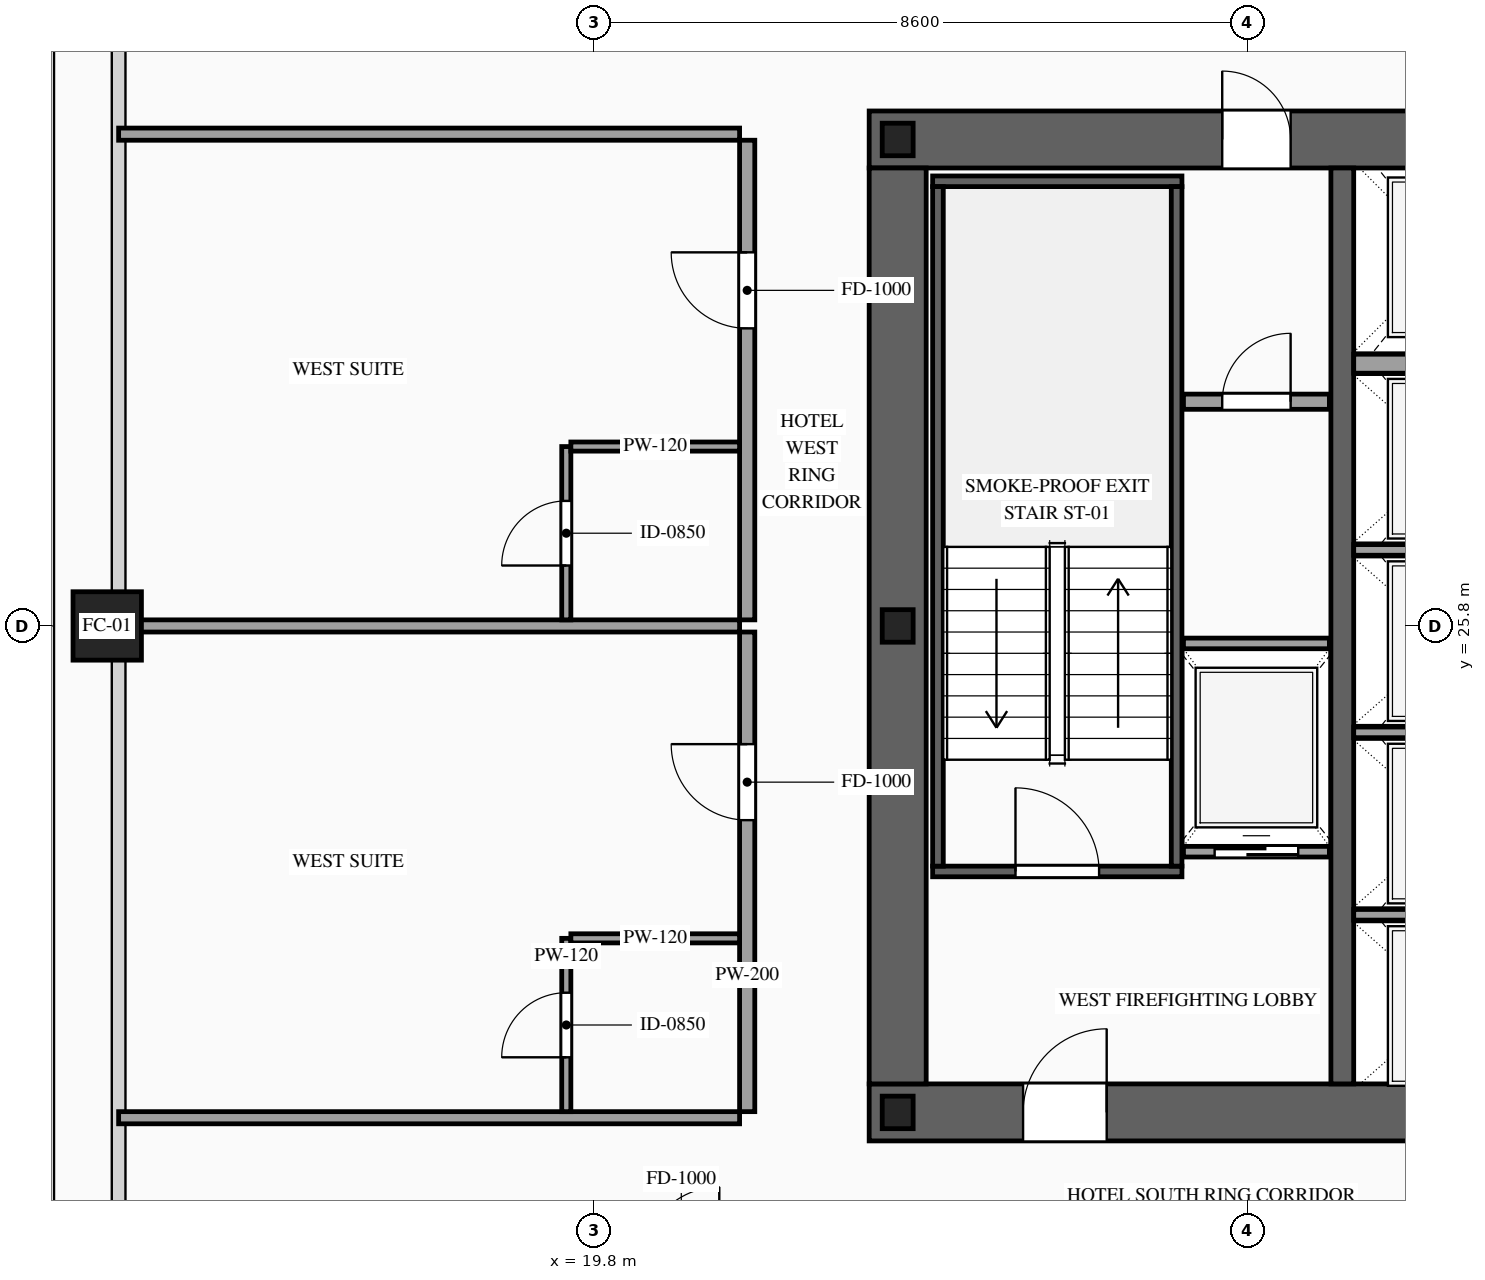
"""IFC4 building model, lengths in metres.
Left out: names, types, materials, properties, quantities, classifications, styles, units other than length and angle.
Written with IfcOpenShell. Run it as: python <this file> out.ifc"""

import sys

from ifc_helpers import new_model, si_unit, direction, frame, frame_2d, origin, origin_2d, place, context, subcontext, project, spatial, rectangle, hollow_rectangle, i_section, extrude, source, transform, mapped, element, fill, save


model = new_model("IFC4")
c1 = context("Model", 3, precision=1e-05, world=origin(), true_north=direction((0.0, 1.0)))
c2 = subcontext(c1, "Body", "Model", "MODEL_VIEW")
j1 = project(units=[si_unit("LENGTHUNIT", "METRE"), si_unit("PLANEANGLEUNIT", "RADIAN")], contexts=[c1])
p1 = place(None, origin())
s1 = spatial("IfcSite", under=j1, at=p1, CompositionType="ELEMENT")
p2 = place(p1, origin())
s2 = spatial("IfcBuilding", under=s1, at=p2, CompositionType="ELEMENT")
p3 = place(p2, frame((0.0, 0.0, 93.8)))
s3 = spatial("IfcBuildingStorey", under=s2, at=p3, CompositionType="ELEMENT", Elevation=93.8)
p4 = place(p3, frame((23.425, 19.4, 0.0), z_axis=(0.0, 0.0, 1.0), x_axis=(1.0, 0.0, 0.0)))
e1 = element("IfcWall", 1, at=p4, inside=s3, PredefinedType="SHEAR", context=c2, shape_type="SweptSolid", body=[
    extrude(rectangle(XDim=27.15, YDim=0.75, at=frame_2d((13.575, 0.0))), origin(), (0.0, 0.0, 1.0), 3.6),
])
p5 = place(p4, frame((2.025, 0.0, 0.0)))
e2 = element("IfcOpeningElement", 2, at=p5, cuts=e1, PredefinedType="OPENING", context=c2, shape_type="SweptSolid", body=[
    extrude(rectangle(XDim=1.1, YDim=2.2, at=frame_2d((0.55, 1.1))), frame((0.0, 0.39, 0.0), z_axis=(0.0, -1.0, 0.0), x_axis=(1.0, 0.0, 0.0)), (0.0, 0.0, 1.0), 0.78),
])
p6 = place(p4, frame((9.925, 0.0, 0.0)))
e3 = element("IfcOpeningElement", 3, at=p6, cuts=e1, PredefinedType="OPENING", context=c2, shape_type="SweptSolid", body=[
    extrude(rectangle(XDim=1.1, YDim=2.2, at=frame_2d((0.55, 1.1))), frame((0.0, 0.39, 0.0), z_axis=(0.0, -1.0, 0.0), x_axis=(1.0, 0.0, 0.0)), (0.0, 0.0, 1.0), 0.78),
])
p7 = place(p4, frame((23.125, 0.0, 0.0)))
e4 = element("IfcOpeningElement", 4, at=p7, cuts=e1, PredefinedType="OPENING", context=c2, shape_type="SweptSolid", body=[
    extrude(rectangle(XDim=1.1, YDim=2.2, at=frame_2d((0.55, 1.1))), frame((0.0, 0.39, 0.0), z_axis=(0.0, -1.0, 0.0), x_axis=(1.0, 0.0, 0.0)), (0.0, 0.0, 1.0), 0.78),
])
p8 = place(p4, frame((19.745, 0.0, 0.0)))
e5 = element("IfcOpeningElement", 5, at=p8, cuts=e1, PredefinedType="OPENING", context=c2, shape_type="SweptSolid", body=[
    extrude(rectangle(XDim=0.9, YDim=2.15, at=frame_2d((0.45, 1.075))), frame((0.0, 0.39, 0.0), z_axis=(0.0, -1.0, 0.0), x_axis=(1.0, 0.0, 0.0)), (0.0, 0.0, 1.0), 0.78),
])
p9 = place(p4, frame((18.305, 0.0, 0.0)))
e6 = element("IfcOpeningElement", 6, at=p9, cuts=e1, PredefinedType="OPENING", context=c2, shape_type="SweptSolid", body=[
    extrude(rectangle(XDim=0.9, YDim=2.15, at=frame_2d((0.45, 1.075))), frame((0.0, 0.39, 0.0), z_axis=(0.0, -1.0, 0.0), x_axis=(1.0, 0.0, 0.0)), (0.0, 0.0, 1.0), 0.78),
])
p10 = place(p3, frame((23.425, 32.2, 0.0), z_axis=(0.0, 0.0, 1.0), x_axis=(1.0, 0.0, 0.0)))
e7 = element("IfcWall", 7, at=p10, inside=s3, PredefinedType="SHEAR", context=c2, shape_type="SweptSolid", body=[
    extrude(rectangle(XDim=27.15, YDim=0.75, at=frame_2d((13.575, 0.0))), origin(), (0.0, 0.0, 1.0), 3.6),
])
p11 = place(p10, frame((4.645, 0.0, 0.0)))
e8 = element("IfcOpeningElement", 8, at=p11, cuts=e7, PredefinedType="OPENING", context=c2, shape_type="SweptSolid", body=[
    extrude(rectangle(XDim=0.9, YDim=2.15, at=frame_2d((0.45, 1.075))), frame((0.0, 0.39, 0.0), z_axis=(0.0, -1.0, 0.0), x_axis=(1.0, 0.0, 0.0)), (0.0, 0.0, 1.0), 0.78),
])
p12 = place(p10, frame((9.925, 0.0, 0.0)))
e9 = element("IfcOpeningElement", 9, at=p12, cuts=e7, PredefinedType="OPENING", context=c2, shape_type="SweptSolid", body=[
    extrude(rectangle(XDim=1.1, YDim=2.2, at=frame_2d((0.55, 1.1))), frame((0.0, 0.39, 0.0), z_axis=(0.0, -1.0, 0.0), x_axis=(1.0, 0.0, 0.0)), (0.0, 0.0, 1.0), 0.78),
])
p13 = place(p10, frame((15.775, 0.0, 0.0)))
e10 = element("IfcOpeningElement", 10, at=p13, cuts=e7, PredefinedType="OPENING", context=c2, shape_type="SweptSolid", body=[
    extrude(rectangle(XDim=1.1, YDim=2.2, at=frame_2d((0.55, 1.1))), frame((0.0, 0.39, 0.0), z_axis=(0.0, -1.0, 0.0), x_axis=(1.0, 0.0, 0.0)), (0.0, 0.0, 1.0), 0.78),
])
p14 = place(p10, frame((18.975, 0.0, 0.0)))
e11 = element("IfcOpeningElement", 11, at=p14, cuts=e7, PredefinedType="OPENING", context=c2, shape_type="SweptSolid", body=[
    extrude(rectangle(XDim=0.9, YDim=2.15, at=frame_2d((0.45, 1.075))), frame((0.0, 0.39, 0.0), z_axis=(0.0, -1.0, 0.0), x_axis=(1.0, 0.0, 0.0)), (0.0, 0.0, 1.0), 0.78),
])
m1 = source(origin(), c2, "Body", "SweptSolid", [
    extrude(rectangle(XDim=12.05, YDim=0.75, at=frame_2d((6.025, 0.0))), origin(), (0.0, 0.0, 1.0), 3.6),
])
p15 = place(p3, frame((23.8, 19.775, 0.0), z_axis=(0.0, 0.0, 1.0), x_axis=(0.0, 1.0, 0.0)))
e12 = element("IfcWall", 12, at=p15, inside=s3, PredefinedType="SHEAR", context=c2, shape_type="MappedRepresentation", body=[
    mapped(m1, transform((0.0, 0.0, 0.0), scale=1.0)),
])
m2 = source(origin(), c2, "Body", "SweptSolid", [
    extrude(rectangle(XDim=12.05, YDim=0.3, at=frame_2d((6.025, 0.0))), origin(), (0.0, 0.0, 1.0), 3.6),
])
p16 = place(p3, frame((29.65, 19.775, 0.0), z_axis=(0.0, 0.0, 1.0), x_axis=(0.0, 1.0, 0.0)))
e13 = element("IfcWall", 13, at=p16, inside=s3, PredefinedType="SOLIDWALL", context=c2, shape_type="MappedRepresentation", body=[
    mapped(m2, transform((0.0, 0.0, 0.0), scale=1.0)),
])
m3 = source(origin(), c2, "Body", "SweptSolid", [
    extrude(i_section(OverallWidth=0.407, OverallDepth=0.428, WebThickness=0.02, FlangeThickness=0.035, at=origin_2d()), origin(), (0.0, 0.0, 1.0), 3.6),
])
for number, where, z_axis, x_axis in (
    (14, (23.8, 19.4, 0.0), (0.0, 0.0, 1.0), (1.0, 0.0, 0.0)),
    (15, (23.8, 25.8, 0.0), (0.0, 0.0, 1.0), (1.0, 0.0, 0.0)),
    (16, (23.8, 32.2, 0.0), (0.0, 0.0, 1.0), (1.0, 0.0, 0.0)),
):
    element("IfcColumn", number, at=place(p3, frame(where, z_axis=z_axis, x_axis=x_axis)), inside=s3, PredefinedType="COLUMN", context=c2, shape_type="MappedRepresentation", body=[
        mapped(m3, transform((0.0, 0.0, 0.0), scale=1.0)),
    ])
m4 = source(origin(), c2, "Body", "SweptSolid", [
    extrude(hollow_rectangle(XDim=0.9, YDim=0.9, WallThickness=0.042, at=origin_2d()), origin(), (0.0, 0.0, 1.0), 3.6),
])
p17 = place(p3, frame((13.4, 25.8, 0.0), z_axis=(0.0, 0.0, 1.0), x_axis=(1.0, 0.0, 0.0)))
e17 = element("IfcColumn", 17, at=p17, inside=s3, PredefinedType="COLUMN", context=c2, shape_type="MappedRepresentation", body=[
    mapped(m4, transform((0.0, 0.0, 0.0), scale=1.0)),
])
p18 = place(p3, frame((27.56, 22.83, 0.0), z_axis=(0.0, 0.0, 1.0), x_axis=(1.0, 0.0, 0.0)))
e18 = element("IfcWall", 18, at=p18, inside=s3, PredefinedType="SOLIDWALL", context=c2, shape_type="SweptSolid", body=[
    extrude(rectangle(XDim=1.92, YDim=0.14, at=frame_2d((0.96, 0.0))), origin(), (0.0, 0.0, 1.0), 3.38),
])
p19 = place(p18, frame((0.41, 0.0, 0.0)))
e19 = element("IfcOpeningElement", 19, at=p19, cuts=e18, PredefinedType="OPENING", context=c2, shape_type="SweptSolid", body=[
    extrude(rectangle(XDim=1.1, YDim=2.2, at=frame_2d((0.55, 1.1))), frame((0.0, 0.085, 0.0), z_axis=(0.0, -1.0, 0.0), x_axis=(1.0, 0.0, 0.0)), (0.0, 0.0, 1.0), 0.17),
])
m5 = source(origin(), c2, "Body", "SweptSolid", [
    extrude(rectangle(XDim=1.92, YDim=0.14, at=frame_2d((0.96, 0.0))), origin(), (0.0, 0.0, 1.0), 3.38),
])
p20 = place(p3, frame((27.56, 25.57, 0.0), z_axis=(0.0, 0.0, 1.0), x_axis=(1.0, 0.0, 0.0)))
e20 = element("IfcWall", 20, at=p20, inside=s3, PredefinedType="SOLIDWALL", context=c2, shape_type="MappedRepresentation", body=[
    mapped(m5, transform((0.0, 0.0, 0.0), scale=1.0)),
])
m6 = source(origin(), c2, "Body", "SweptSolid", [
    extrude(rectangle(XDim=2.5, YDim=0.14, at=frame_2d((1.25, 0.0))), origin(), (0.0, 0.0, 1.0), 3.38),
])
for number, where, z_axis, x_axis in (
    (21, (29.8, 22.0, 0.0), (0.0, 0.0, 1.0), (1.0, 0.0, 0.0)),
    (22, (29.8, 24.4, 0.0), (0.0, 0.0, 1.0), (1.0, 0.0, 0.0)),
    (23, (29.8, 26.8, 0.0), (0.0, 0.0, 1.0), (1.0, 0.0, 0.0)),
):
    element("IfcWall", number, at=place(p3, frame(where, z_axis=z_axis, x_axis=x_axis)), inside=s3, PredefinedType="SOLIDWALL", context=c2, shape_type="MappedRepresentation", body=[
        mapped(m6, transform((0.0, 0.0, 0.0), scale=1.0)),
    ])
m7 = source(origin(), c2, "Body", "SweptSolid", [
    extrude(rectangle(XDim=2.5, YDim=0.25, at=frame_2d((1.25, 0.0))), origin(), (0.0, 0.0, 1.0), 3.38),
])
p21 = place(p3, frame((29.8, 29.25, 0.0), z_axis=(0.0, 0.0, 1.0), x_axis=(1.0, 0.0, 0.0)))
e24 = element("IfcWall", 24, at=p21, inside=s3, PredefinedType="SOLIDWALL", context=c2, shape_type="MappedRepresentation", body=[
    mapped(m7, transform((0.0, 0.0, 0.0), scale=1.0)),
])
p22 = place(p3, frame((24.26, 22.57, 0.0), z_axis=(0.0, 0.0, 1.0), x_axis=(1.0, 0.0, 0.0)))
e25 = element("IfcWall", 25, at=p22, inside=s3, PredefinedType="SOLIDWALL", context=c2, shape_type="SweptSolid", body=[
    extrude(rectangle(XDim=3.28, YDim=0.14, at=frame_2d((1.64, 0.0))), origin(), (0.0, 0.0, 1.0), 3.38),
])
p23 = place(p22, frame((1.09, 0.0, 0.0)))
e26 = element("IfcOpeningElement", 26, at=p23, cuts=e25, PredefinedType="OPENING", context=c2, shape_type="SweptSolid", body=[
    extrude(rectangle(XDim=1.1, YDim=2.2, at=frame_2d((0.55, 1.1))), frame((0.0, 0.085, 0.0), z_axis=(0.0, -1.0, 0.0), x_axis=(1.0, 0.0, 0.0)), (0.0, 0.0, 1.0), 0.17),
])
m8 = source(origin(), c2, "Body", "SweptSolid", [
    extrude(rectangle(XDim=3.28, YDim=0.14, at=frame_2d((1.64, 0.0))), origin(), (0.0, 0.0, 1.0), 3.38),
])
p24 = place(p3, frame((24.26, 31.65, 0.0), z_axis=(0.0, 0.0, 1.0), x_axis=(1.0, 0.0, 0.0)))
e27 = element("IfcWall", 27, at=p24, inside=s3, PredefinedType="SOLIDWALL", context=c2, shape_type="MappedRepresentation", body=[
    mapped(m8, transform((0.0, 0.0, 0.0), scale=1.0)),
])
m9 = source(origin(), c2, "Body", "SweptSolid", [
    extrude(rectangle(XDim=8.94, YDim=0.14, at=frame_2d((4.47, 0.0))), origin(), (0.0, 0.0, 1.0), 3.38),
])
for number, where, z_axis, x_axis in (
    (28, (24.33, 22.64, 0.0), (0.0, 0.0, 1.0), (0.0, 1.0, 0.0)),
    (29, (27.47, 22.64, 0.0), (0.0, 0.0, 1.0), (0.0, 1.0, 0.0)),
):
    element("IfcWall", number, at=place(p3, frame(where, z_axis=z_axis, x_axis=x_axis)), inside=s3, PredefinedType="SOLIDWALL", context=c2, shape_type="MappedRepresentation", body=[
        mapped(m9, transform((0.0, 0.0, 0.0), scale=1.0)),
    ])
p25 = place(p3, frame((27.56, 28.75, 0.0), z_axis=(0.0, 0.0, 1.0), x_axis=(1.0, 0.0, 0.0)))
e30 = element("IfcWall", 30, at=p25, inside=s3, PredefinedType="PARTITIONING", context=c2, shape_type="SweptSolid", body=[
    extrude(rectangle(XDim=1.92, YDim=0.2, at=frame_2d((0.96, 0.0))), origin(), (0.0, 0.0, 1.0), 3.38),
])
p26 = place(p25, frame((0.51, 0.0, 0.0)))
e31 = element("IfcOpeningElement", 31, at=p26, cuts=e30, PredefinedType="OPENING", context=c2, shape_type="SweptSolid", body=[
    extrude(rectangle(XDim=0.9, YDim=2.15, at=frame_2d((0.45, 1.075))), frame((0.0, 0.115, 0.0), z_axis=(0.0, -1.0, 0.0), x_axis=(1.0, 0.0, 0.0)), (0.0, 0.0, 1.0), 0.23),
])
p27 = place(p3, frame((21.82, 19.41, 0.0), z_axis=(0.0, 0.0, 1.0), x_axis=(0.0, 1.0, 0.0)))
e32 = element("IfcWall", 32, at=p27, inside=s3, PredefinedType="PARTITIONING", context=c2, shape_type="SweptSolid", body=[
    extrude(rectangle(XDim=6.31, YDim=0.2, at=frame_2d((3.155, 0.0))), origin(), (0.0, 0.0, 1.0), 3.38),
])
p28 = place(p27, frame((3.835, 0.0, 0.0)))
e33 = element("IfcOpeningElement", 33, at=p28, cuts=e32, PredefinedType="OPENING", context=c2, shape_type="SweptSolid", body=[
    extrude(rectangle(XDim=1.0, YDim=2.2, at=frame_2d((0.5, 1.1))), frame((0.0, 0.115, 0.0), z_axis=(0.0, -1.0, 0.0), x_axis=(1.0, 0.0, 0.0)), (0.0, 0.0, 1.0), 0.23),
])
m10 = source(origin(), c2, "Body", "SweptSolid", [
    extrude(rectangle(XDim=8.17, YDim=0.16, at=frame_2d((4.085, 0.0))), origin(), (0.0, 0.0, 1.0), 2.675),
])
p29 = place(p3, frame((13.55, 25.8, 0.0), z_axis=(0.0, 0.0, 1.0), x_axis=(1.0, 0.0, 0.0)))
e34 = element("IfcWall", 34, at=p29, inside=s3, PredefinedType="PARTITIONING", context=c2, shape_type="MappedRepresentation", body=[
    mapped(m10, transform((0.0, 0.0, 0.0), scale=1.0)),
])
m11 = source(origin(), c2, "Body", "SweptSolid", [
    extrude(rectangle(XDim=8.17, YDim=0.16, at=frame_2d((4.085, 0.0))), origin(), (0.0, 0.0, 1.0), 2.875),
])
p30 = place(p3, frame((13.55, 19.33, 0.0), z_axis=(0.0, 0.0, 1.0), x_axis=(1.0, 0.0, 0.0)))
e35 = element("IfcWall", 35, at=p30, inside=s3, PredefinedType="PARTITIONING", context=c2, shape_type="MappedRepresentation", body=[
    mapped(m11, transform((0.0, 0.0, 0.0), scale=1.0)),
])
p31 = place(p3, frame((19.44, 19.41, 0.0), z_axis=(0.0, 0.0, 1.0), x_axis=(0.0, 1.0, 0.0)))
e36 = element("IfcWall", 36, at=p31, inside=s3, PredefinedType="PARTITIONING", context=c2, shape_type="SweptSolid", body=[
    extrude(rectangle(XDim=2.28, YDim=0.12, at=frame_2d((1.14, 0.0))), origin(), (0.0, 0.0, 1.0), 3.38),
])
p32 = place(p31, frame((0.715, 0.0, 0.0)))
e37 = element("IfcOpeningElement", 37, at=p32, cuts=e36, PredefinedType="OPENING", context=c2, shape_type="SweptSolid", body=[
    extrude(rectangle(XDim=0.85, YDim=2.1, at=frame_2d((0.425, 1.05))), frame((0.0, 0.075, 0.0), z_axis=(0.0, -1.0, 0.0), x_axis=(1.0, 0.0, 0.0)), (0.0, 0.0, 1.0), 0.15),
])
m12 = source(origin(), c2, "Body", "SweptSolid", [
    extrude(rectangle(XDim=2.22, YDim=0.12, at=frame_2d((1.11, 0.0))), origin(), (0.0, 0.0, 1.0), 3.38),
])
p33 = place(p3, frame((19.5, 21.69, 0.0), z_axis=(0.0, 0.0, 1.0), x_axis=(1.0, 0.0, 0.0)))
e38 = element("IfcWall", 38, at=p33, inside=s3, PredefinedType="PARTITIONING", context=c2, shape_type="MappedRepresentation", body=[
    mapped(m12, transform((0.0, 0.0, 0.0), scale=1.0)),
])
p34 = place(p3, frame((21.82, 25.88, 0.0), z_axis=(0.0, 0.0, 1.0), x_axis=(0.0, 1.0, 0.0)))
e39 = element("IfcWall", 39, at=p34, inside=s3, PredefinedType="PARTITIONING", context=c2, shape_type="SweptSolid", body=[
    extrude(rectangle(XDim=6.31, YDim=0.2, at=frame_2d((3.155, 0.0))), origin(), (0.0, 0.0, 1.0), 3.38),
])
p35 = place(p34, frame((3.835, 0.0, 0.0)))
e40 = element("IfcOpeningElement", 40, at=p35, cuts=e39, PredefinedType="OPENING", context=c2, shape_type="SweptSolid", body=[
    extrude(rectangle(XDim=1.0, YDim=2.2, at=frame_2d((0.5, 1.1))), frame((0.0, 0.115, 0.0), z_axis=(0.0, -1.0, 0.0), x_axis=(1.0, 0.0, 0.0)), (0.0, 0.0, 1.0), 0.23),
])
p36 = place(p3, frame((13.55, 32.27, 0.0), z_axis=(0.0, 0.0, 1.0), x_axis=(1.0, 0.0, 0.0)))
e41 = element("IfcWall", 41, at=p36, inside=s3, PredefinedType="PARTITIONING", context=c2, shape_type="MappedRepresentation", body=[
    mapped(m11, transform((0.0, 0.0, 0.0), scale=1.0)),
])
p37 = place(p3, frame((19.44, 25.88, 0.0), z_axis=(0.0, 0.0, 1.0), x_axis=(0.0, 1.0, 0.0)))
e42 = element("IfcWall", 42, at=p37, inside=s3, PredefinedType="PARTITIONING", context=c2, shape_type="SweptSolid", body=[
    extrude(rectangle(XDim=2.28, YDim=0.12, at=frame_2d((1.14, 0.0))), origin(), (0.0, 0.0, 1.0), 3.38),
])
p38 = place(p37, frame((0.715, 0.0, 0.0)))
e43 = element("IfcOpeningElement", 43, at=p38, cuts=e42, PredefinedType="OPENING", context=c2, shape_type="SweptSolid", body=[
    extrude(rectangle(XDim=0.85, YDim=2.1, at=frame_2d((0.425, 1.05))), frame((0.0, 0.075, 0.0), z_axis=(0.0, -1.0, 0.0), x_axis=(1.0, 0.0, 0.0)), (0.0, 0.0, 1.0), 0.15),
])
p39 = place(p3, frame((19.5, 28.16, 0.0), z_axis=(0.0, 0.0, 1.0), x_axis=(1.0, 0.0, 0.0)))
e44 = element("IfcWall", 44, at=p39, inside=s3, PredefinedType="PARTITIONING", context=c2, shape_type="MappedRepresentation", body=[
    mapped(m12, transform((0.0, 0.0, 0.0), scale=1.0)),
])
m13 = source(origin(), c2, "Body", "SweptSolid", [
    extrude(rectangle(XDim=1.1, YDim=2.2, at=frame_2d((0.55, 1.1))), frame((0.0, 0.025, 0.0), z_axis=(0.0, -1.0, 0.0), x_axis=(1.0, 0.0, 0.0)), (0.0, 0.0, 1.0), 0.05),
])
p40 = place(p19, origin())
e45 = element("IfcDoor", 45, at=p40, inside=s3, OperationType="SLIDING_TO_LEFT", PredefinedType="DOOR", context=c2, shape_type="MappedRepresentation", body=[
    mapped(m13, transform((0.0, 0.0, 0.0), scale=1.0)),
])
fill(e19, e45)
m14 = source(origin(), c2, "Body", "SweptSolid", [
    extrude(rectangle(XDim=1.1, YDim=2.2, at=frame_2d((0.55, 1.1))), frame((0.0, 0.025, 0.0), z_axis=(0.0, -1.0, 0.0), x_axis=(1.0, 0.0, 0.0)), (0.0, 0.0, 1.0), 0.05),
])
p41 = place(p23, origin())
e46 = element("IfcDoor", 46, at=p41, inside=s3, OperationType="SINGLE_SWING_LEFT", PredefinedType="DOOR", context=c2, shape_type="MappedRepresentation", body=[
    mapped(m14, transform((0.0, 0.0, 0.0), scale=1.0)),
])
fill(e26, e46)
p42 = place(p5, origin())
e47 = element("IfcDoor", 47, at=p42, inside=s3, OperationType="SINGLE_SWING_RIGHT", PredefinedType="DOOR", context=c2, shape_type="MappedRepresentation", body=[
    mapped(m14, transform((0.0, 0.0, 0.0), scale=1.0)),
])
fill(e2, e47)
m15 = source(origin(), c2, "Body", "SweptSolid", [
    extrude(rectangle(XDim=0.9, YDim=2.15, at=frame_2d((0.45, 1.075))), frame((0.0, 0.025, 0.0), z_axis=(0.0, -1.0, 0.0), x_axis=(1.0, 0.0, 0.0)), (0.0, 0.0, 1.0), 0.05),
])
p43 = place(p11, origin())
e48 = element("IfcDoor", 48, at=p43, inside=s3, OperationType="SINGLE_SWING_LEFT", PredefinedType="DOOR", context=c2, shape_type="MappedRepresentation", body=[
    mapped(m15, transform((0.0, 0.0, 0.0), scale=1.0)),
])
fill(e8, e48)
p44 = place(p26, origin())
e49 = element("IfcDoor", 49, at=p44, inside=s3, OperationType="SINGLE_SWING_RIGHT", PredefinedType="DOOR", context=c2, shape_type="MappedRepresentation", body=[
    mapped(m15, transform((0.0, 0.0, 0.0), scale=1.0)),
])
fill(e31, e49)
m16 = source(origin(), c2, "Body", "SweptSolid", [
    extrude(rectangle(XDim=1.0, YDim=2.2, at=frame_2d((0.5, 1.1))), frame((0.0, 0.025, 0.0), z_axis=(0.0, -1.0, 0.0), x_axis=(1.0, 0.0, 0.0)), (0.0, 0.0, 1.0), 0.05),
])
p45 = place(p28, origin())
e50 = element("IfcDoor", 50, at=p45, inside=s3, OperationType="SINGLE_SWING_RIGHT", PredefinedType="DOOR", context=c2, shape_type="MappedRepresentation", body=[
    mapped(m16, transform((0.0, 0.0, 0.0), scale=1.0)),
])
fill(e33, e50)
m17 = source(origin(), c2, "Body", "SweptSolid", [
    extrude(rectangle(XDim=0.85, YDim=2.1, at=frame_2d((0.425, 1.05))), frame((0.0, 0.025, 0.0), z_axis=(0.0, -1.0, 0.0), x_axis=(1.0, 0.0, 0.0)), (0.0, 0.0, 1.0), 0.05),
])
p46 = place(p32, origin())
e51 = element("IfcDoor", 51, at=p46, inside=s3, OperationType="SINGLE_SWING_LEFT", PredefinedType="DOOR", context=c2, shape_type="MappedRepresentation", body=[
    mapped(m17, transform((0.0, 0.0, 0.0), scale=1.0)),
])
fill(e37, e51)
p47 = place(p35, origin())
e52 = element("IfcDoor", 52, at=p47, inside=s3, OperationType="SINGLE_SWING_RIGHT", PredefinedType="DOOR", context=c2, shape_type="MappedRepresentation", body=[
    mapped(m16, transform((0.0, 0.0, 0.0), scale=1.0)),
])
fill(e40, e52)
p48 = place(p38, origin())
e53 = element("IfcDoor", 53, at=p48, inside=s3, OperationType="SINGLE_SWING_LEFT", PredefinedType="DOOR", context=c2, shape_type="MappedRepresentation", body=[
    mapped(m17, transform((0.0, 0.0, 0.0), scale=1.0)),
])
fill(e43, e53)
save(model, sys.argv[1])
